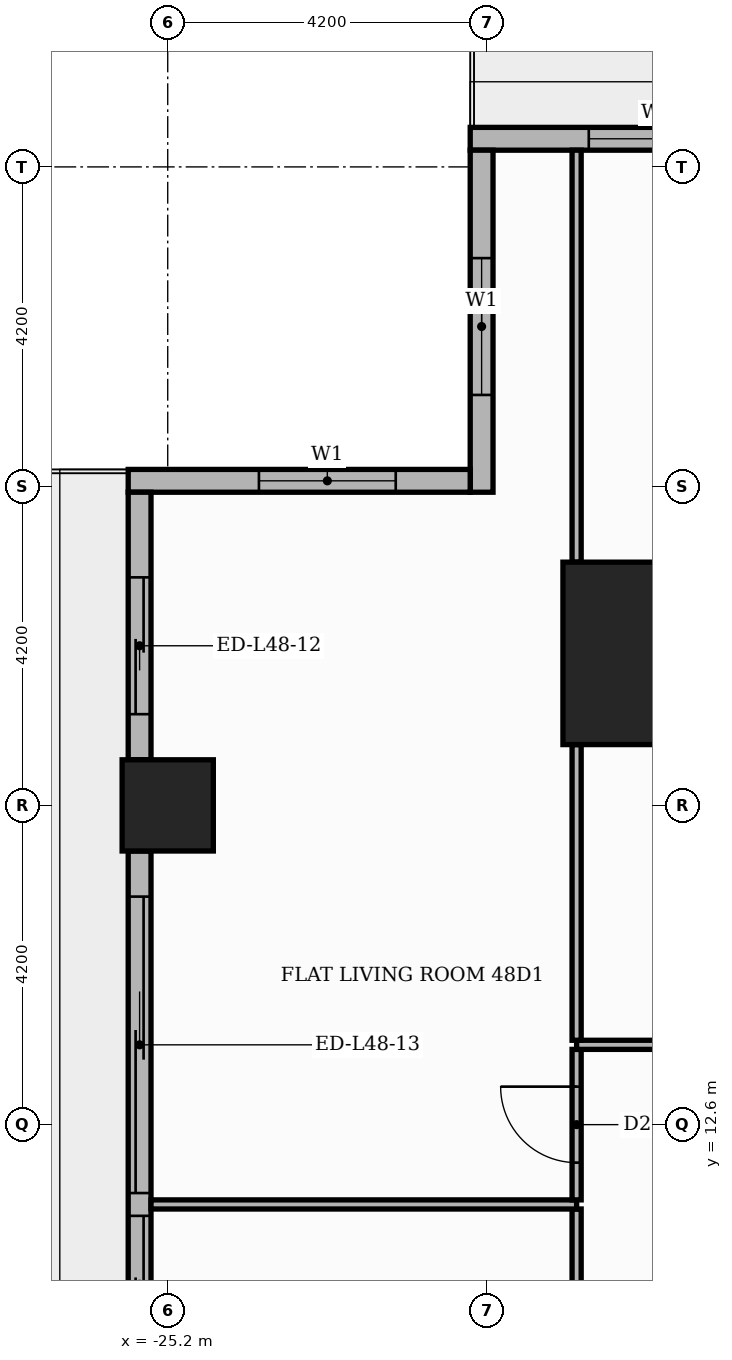
"""IFC4 building model, lengths in metres.
Left out: names, types, materials, properties, quantities, classifications, styles, units other than length and angle.
Written with IfcOpenShell. Run it as: python <this file> out.ifc"""

import sys

from ifc_helpers import new_model, si_unit, direction, frame, frame_2d, origin, origin_2d, place, context, subcontext, project, spatial, rectangle, extrude, element, fill, save


model = new_model("IFC4")
c1 = context("Model", 3, precision=1e-05, world=origin(), true_north=direction((0.0, 1.0)))
c2 = subcontext(c1, "Body", "Model", "MODEL_VIEW")
j1 = project(units=[si_unit("LENGTHUNIT", "METRE"), si_unit("PLANEANGLEUNIT", "RADIAN")], contexts=[c1])
p1 = place(None, origin())
s1 = spatial("IfcSite", under=j1, at=p1, CompositionType="ELEMENT")
p2 = place(p1, origin())
s2 = spatial("IfcBuilding", under=s1, at=p2, CompositionType="ELEMENT")
p3 = place(p2, frame((0.0, 0.0, 204.0)))
s3 = spatial("IfcBuildingStorey", under=s2, at=p3, CompositionType="ELEMENT", Elevation=204.0)
p4 = place(p3, frame((-18.8, 18.8, 0.0), z_axis=(0.0, 0.0, 1.0), x_axis=(1.0, 0.0, 0.0)))
e1 = element("IfcColumn", 1, at=p4, inside=s3, PredefinedType="COLUMN", context=c2, shape_type="SweptSolid", body=[
    extrude(rectangle(XDim=2.4, YDim=2.4, at=origin_2d()), origin(), (0.0, 0.0, 1.0), 3.9),
])
p5 = place(p3, frame((-25.2, 16.8, 0.0), z_axis=(0.0, 0.0, 1.0), x_axis=(1.0, 0.0, 0.0)))
e2 = element("IfcColumn", 2, at=p5, inside=s3, PredefinedType="COLUMN", context=c2, shape_type="SweptSolid", body=[
    extrude(rectangle(XDim=1.2, YDim=1.2, at=origin_2d()), origin(), (0.0, 0.0, 1.0), 3.9),
])
p6 = place(p3, frame((-17.4, 25.57, 0.0), z_axis=(0.0, 0.0, 1.0), x_axis=(-1.0, 0.0, 0.0)))
e3 = element("IfcWall", 3, at=p6, inside=s3, PredefinedType="STANDARD", context=c2, shape_type="SweptSolid", body=[
    extrude(rectangle(XDim=3.82, YDim=0.3, at=frame_2d((1.91, 0.0))), origin(), (0.0, 0.0, 1.0), 3.48),
])
p7 = place(p6, frame((0.46, 0.0, 0.9)))
e4 = element("IfcOpeningElement", 4, at=p7, cuts=e3, PredefinedType="OPENING", context=c2, shape_type="SweptSolid", body=[
    extrude(rectangle(XDim=1.8, YDim=2.1, at=frame_2d((0.9, 1.05))), frame((0.0, 0.16, 0.0), z_axis=(0.0, -1.0, 0.0), x_axis=(1.0, 0.0, 0.0)), (0.0, 0.0, 1.0), 0.32),
])
p8 = place(p3, frame((-21.07, 25.42, 0.0), z_axis=(0.0, 0.0, 1.0), x_axis=(0.0, -1.0, 0.0)))
e5 = element("IfcWall", 5, at=p8, inside=s3, PredefinedType="STANDARD", context=c2, shape_type="SweptSolid", body=[
    extrude(rectangle(XDim=4.5, YDim=0.3, at=frame_2d((2.25, 0.0))), origin(), (0.0, 0.0, 1.0), 3.48),
])
p9 = place(p8, frame((1.42, 0.0, 0.9)))
e6 = element("IfcOpeningElement", 6, at=p9, cuts=e5, PredefinedType="OPENING", context=c2, shape_type="SweptSolid", body=[
    extrude(rectangle(XDim=1.8, YDim=2.1, at=frame_2d((0.9, 1.05))), frame((0.0, 0.16, 0.0), z_axis=(0.0, -1.0, 0.0), x_axis=(1.0, 0.0, 0.0)), (0.0, 0.0, 1.0), 0.32),
])
p10 = place(p3, frame((-21.22, 21.07, 0.0), z_axis=(0.0, 0.0, 1.0), x_axis=(-1.0, 0.0, 0.0)))
e7 = element("IfcWall", 7, at=p10, inside=s3, PredefinedType="STANDARD", context=c2, shape_type="SweptSolid", body=[
    extrude(rectangle(XDim=4.5, YDim=0.3, at=frame_2d((2.25, 0.0))), origin(), (0.0, 0.0, 1.0), 3.48),
])
p11 = place(p10, frame((0.98, 0.0, 0.9)))
e8 = element("IfcOpeningElement", 8, at=p11, cuts=e7, PredefinedType="OPENING", context=c2, shape_type="SweptSolid", body=[
    extrude(rectangle(XDim=1.8, YDim=2.1, at=frame_2d((0.9, 1.05))), frame((0.0, 0.16, 0.0), z_axis=(0.0, -1.0, 0.0), x_axis=(1.0, 0.0, 0.0)), (0.0, 0.0, 1.0), 0.32),
])
p12 = place(p3, frame((-25.57, 20.92, 0.0), z_axis=(0.0, 0.0, 1.0), x_axis=(0.0, -1.0, 0.0)))
e9 = element("IfcWall", 9, at=p12, inside=s3, PredefinedType="STANDARD", context=c2, shape_type="SweptSolid", body=[
    extrude(rectangle(XDim=3.52, YDim=0.3, at=frame_2d((1.76, 0.0))), origin(), (0.0, 0.0, 1.0), 3.48),
])
p13 = place(p12, frame((1.12, 0.0, 0.0)))
e10 = element("IfcOpeningElement", 10, at=p13, cuts=e9, PredefinedType="OPENING", context=c2, shape_type="SweptSolid", body=[
    extrude(rectangle(XDim=1.8, YDim=2.4, at=frame_2d((0.9, 1.2))), frame((0.0, 0.16, 0.0), z_axis=(0.0, -1.0, 0.0), x_axis=(1.0, 0.0, 0.0)), (0.0, 0.0, 1.0), 0.32),
])
p14 = place(p3, frame((-25.57, 16.2, 0.0), z_axis=(0.0, 0.0, 1.0), x_axis=(0.0, -1.0, 0.0)))
e11 = element("IfcWall", 11, at=p14, inside=s3, PredefinedType="STANDARD", context=c2, shape_type="SweptSolid", body=[
    extrude(rectangle(XDim=7.2, YDim=0.3, at=frame_2d((3.6, 0.0))), origin(), (0.0, 0.0, 1.0), 3.48),
])
p15 = place(p14, frame((0.6, 0.0, 0.0)))
e12 = element("IfcOpeningElement", 12, at=p15, cuts=e11, PredefinedType="OPENING", context=c2, shape_type="SweptSolid", body=[
    extrude(rectangle(XDim=3.9, YDim=2.4, at=frame_2d((1.95, 1.2))), frame((0.0, 0.16, 0.0), z_axis=(0.0, -1.0, 0.0), x_axis=(1.0, 0.0, 0.0)), (0.0, 0.0, 1.0), 0.32),
])
p16 = place(p14, frame((4.8, 0.0, 0.0)))
e13 = element("IfcOpeningElement", 13, at=p16, cuts=e11, PredefinedType="OPENING", context=c2, shape_type="SweptSolid", body=[
    extrude(rectangle(XDim=1.8, YDim=2.4, at=frame_2d((0.9, 1.2))), frame((0.0, 0.16, 0.0), z_axis=(0.0, -1.0, 0.0), x_axis=(1.0, 0.0, 0.0)), (0.0, 0.0, 1.0), 0.32),
])
p17 = place(p3, frame((-19.82, 7.41, 0.0), z_axis=(0.0, 0.0, 1.0), x_axis=(0.0, 1.0, 0.0)))
e14 = element("IfcWall", 14, at=p17, inside=s3, PredefinedType="PARTITIONING", context=c2, shape_type="SweptSolid", body=[
    extrude(rectangle(XDim=4.08, YDim=0.12, at=frame_2d((2.04, 0.0))), origin(), (0.0, 0.0, 1.0), 3.48),
])
p18 = place(p17, frame((1.59, 0.0, 0.0)))
e15 = element("IfcOpeningElement", 15, at=p18, cuts=e14, PredefinedType="OPENING", context=c2, shape_type="SweptSolid", body=[
    extrude(rectangle(XDim=0.9, YDim=2.1, at=frame_2d((0.45, 1.05))), frame((0.0, 0.07, 0.0), z_axis=(0.0, -1.0, 0.0), x_axis=(1.0, 0.0, 0.0)), (0.0, 0.0, 1.0), 0.14),
])
p19 = place(p3, frame((-25.42, 11.55, 0.0), z_axis=(0.0, 0.0, 1.0), x_axis=(1.0, 0.0, 0.0)))
e16 = element("IfcWall", 16, at=p19, inside=s3, PredefinedType="PARTITIONING", context=c2, shape_type="SweptSolid", body=[
    extrude(rectangle(XDim=5.6, YDim=0.12, at=frame_2d((2.8, 0.0))), origin(), (0.0, 0.0, 1.0), 3.48),
])
p20 = place(p3, frame((-19.82, 11.61, 0.0), z_axis=(0.0, 0.0, 1.0), x_axis=(0.0, 1.0, 0.0)))
e17 = element("IfcWall", 17, at=p20, inside=s3, PredefinedType="PARTITIONING", context=c2, shape_type="SweptSolid", body=[
    extrude(rectangle(XDim=1.98, YDim=0.12, at=frame_2d((0.99, 0.0))), origin(), (0.0, 0.0, 1.0), 3.48),
])
p21 = place(p20, frame((0.49, 0.0, 0.0)))
e18 = element("IfcOpeningElement", 18, at=p21, cuts=e17, PredefinedType="OPENING", context=c2, shape_type="SweptSolid", body=[
    extrude(rectangle(XDim=1.0, YDim=2.1, at=frame_2d((0.5, 1.05))), frame((0.0, 0.07, 0.0), z_axis=(0.0, -1.0, 0.0), x_axis=(1.0, 0.0, 0.0)), (0.0, 0.0, 1.0), 0.14),
])
p22 = place(p3, frame((-19.82, 13.65, 0.0), z_axis=(0.0, 0.0, 1.0), x_axis=(1.0, 0.0, 0.0)))
e19 = element("IfcWall", 19, at=p22, inside=s3, PredefinedType="PARTITIONING", context=c2, shape_type="SweptSolid", body=[
    extrude(rectangle(XDim=6.17, YDim=0.12, at=frame_2d((3.085, 0.0))), origin(), (0.0, 0.0, 1.0), 3.48),
])
p23 = place(p22, frame((2.635, 0.0, 0.0)))
e20 = element("IfcOpeningElement", 20, at=p23, cuts=e19, PredefinedType="OPENING", context=c2, shape_type="SweptSolid", body=[
    extrude(rectangle(XDim=0.9, YDim=2.1, at=frame_2d((0.45, 1.05))), frame((0.0, 0.07, 0.0), z_axis=(0.0, -1.0, 0.0), x_axis=(1.0, 0.0, 0.0)), (0.0, 0.0, 1.0), 0.14),
])
p24 = place(p3, frame((-19.82, 13.71, 0.0), z_axis=(0.0, 0.0, 1.0), x_axis=(0.0, 1.0, 0.0)))
e21 = element("IfcWall", 21, at=p24, inside=s3, PredefinedType="PARTITIONING", context=c2, shape_type="SweptSolid", body=[
    extrude(rectangle(XDim=3.89, YDim=0.12, at=frame_2d((1.945, 0.0))), origin(), (0.0, 0.0, 1.0), 3.48),
])
p25 = place(p3, frame((-19.82, 20.0, 0.0), z_axis=(0.0, 0.0, 1.0), x_axis=(0.0, 1.0, 0.0)))
e22 = element("IfcWall", 22, at=p25, inside=s3, PredefinedType="PARTITIONING", context=c2, shape_type="SweptSolid", body=[
    extrude(rectangle(XDim=5.42, YDim=0.12, at=frame_2d((2.71, 0.0))), origin(), (0.0, 0.0, 1.0), 3.48),
])
p26 = place(p7, origin())
e23 = element("IfcWindow", 23, at=p26, inside=s3, PartitioningType="SINGLE_PANEL", PredefinedType="WINDOW", context=c2, shape_type="SweptSolid", body=[
    extrude(rectangle(XDim=1.8, YDim=2.1, at=frame_2d((0.9, 1.05))), frame((0.0, 0.03, 0.0), z_axis=(0.0, -1.0, 0.0), x_axis=(1.0, 0.0, 0.0)), (0.0, 0.0, 1.0), 0.06),
])
fill(e4, e23)
p27 = place(p9, origin())
e24 = element("IfcWindow", 24, at=p27, inside=s3, PartitioningType="SINGLE_PANEL", PredefinedType="WINDOW", context=c2, shape_type="SweptSolid", body=[
    extrude(rectangle(XDim=1.8, YDim=2.1, at=frame_2d((0.9, 1.05))), frame((0.0, 0.03, 0.0), z_axis=(0.0, -1.0, 0.0), x_axis=(1.0, 0.0, 0.0)), (0.0, 0.0, 1.0), 0.06),
])
fill(e6, e24)
p28 = place(p11, origin())
e25 = element("IfcWindow", 25, at=p28, inside=s3, PartitioningType="SINGLE_PANEL", PredefinedType="WINDOW", context=c2, shape_type="SweptSolid", body=[
    extrude(rectangle(XDim=1.8, YDim=2.1, at=frame_2d((0.9, 1.05))), frame((0.0, 0.03, 0.0), z_axis=(0.0, -1.0, 0.0), x_axis=(1.0, 0.0, 0.0)), (0.0, 0.0, 1.0), 0.06),
])
fill(e8, e25)
p29 = place(p13, origin())
e26 = element("IfcDoor", 26, at=p29, inside=s3, OperationType="SLIDING_TO_RIGHT", PredefinedType="DOOR", context=c2, shape_type="SweptSolid", body=[
    extrude(rectangle(XDim=1.8, YDim=2.4, at=frame_2d((0.9, 1.2))), frame((0.0, 0.025, 0.0), z_axis=(0.0, -1.0, 0.0), x_axis=(1.0, 0.0, 0.0)), (0.0, 0.0, 1.0), 0.05),
])
fill(e10, e26)
p30 = place(p15, origin())
e27 = element("IfcDoor", 27, at=p30, inside=s3, OperationType="SLIDING_TO_LEFT", PredefinedType="DOOR", context=c2, shape_type="SweptSolid", body=[
    extrude(rectangle(XDim=3.9, YDim=2.4, at=frame_2d((1.95, 1.2))), frame((0.0, 0.025, 0.0), z_axis=(0.0, -1.0, 0.0), x_axis=(1.0, 0.0, 0.0)), (0.0, 0.0, 1.0), 0.05),
])
fill(e12, e27)
p31 = place(p16, origin())
e28 = element("IfcDoor", 28, at=p31, inside=s3, OperationType="SLIDING_TO_RIGHT", PredefinedType="DOOR", context=c2, shape_type="SweptSolid", body=[
    extrude(rectangle(XDim=1.8, YDim=2.4, at=frame_2d((0.9, 1.2))), frame((0.0, 0.025, 0.0), z_axis=(0.0, -1.0, 0.0), x_axis=(1.0, 0.0, 0.0)), (0.0, 0.0, 1.0), 0.05),
])
fill(e13, e28)
p32 = place(p21, origin())
e29 = element("IfcDoor", 29, at=p32, inside=s3, OperationType="SINGLE_SWING_RIGHT", PredefinedType="DOOR", context=c2, shape_type="SweptSolid", body=[
    extrude(rectangle(XDim=1.0, YDim=2.1, at=frame_2d((0.5, 1.05))), frame((0.0, 0.025, 0.0), z_axis=(0.0, -1.0, 0.0), x_axis=(1.0, 0.0, 0.0)), (0.0, 0.0, 1.0), 0.05),
])
fill(e18, e29)
save(model, sys.argv[1])
